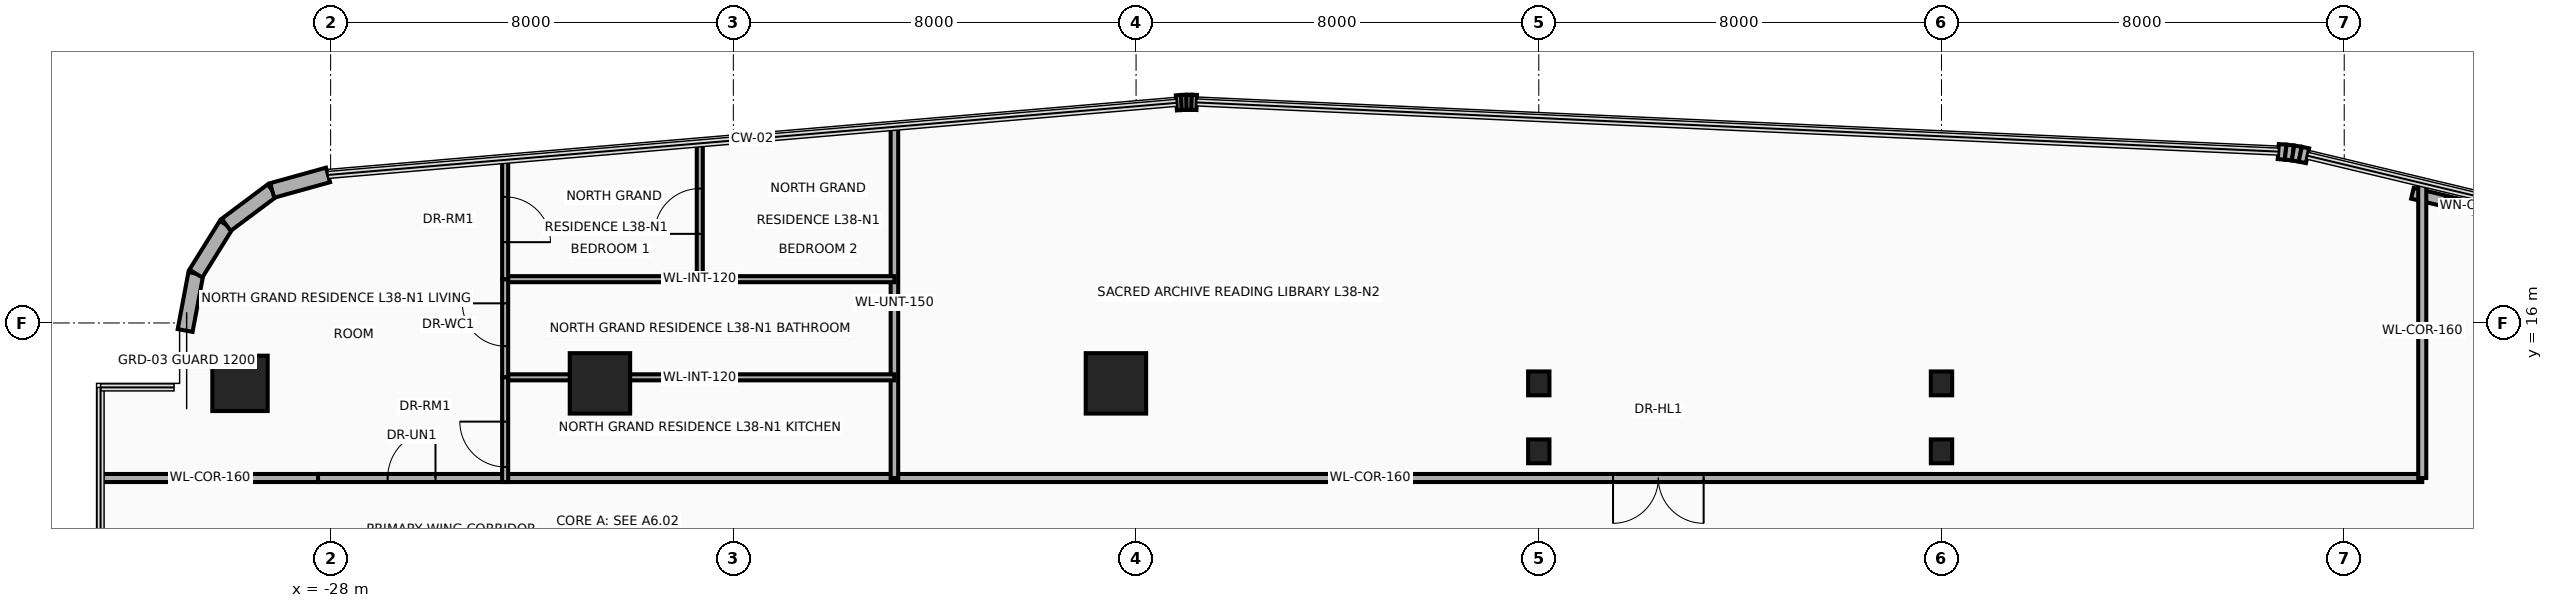
"""IFC4 building model, lengths in metres.
Left out: names, types, materials, properties, quantities, classifications, styles, units other than length and angle.
Written with IfcOpenShell. Run it as: python <this file> out.ifc"""

import sys

from ifc_helpers import new_model, si_unit, direction, frame, frame_2d, origin, origin_2d, place, context, subcontext, project, spatial, rectangle, circle, i_section, extrude, source, transform, mapped, element, fill, save


model = new_model("IFC4")
c1 = context("Model", 3, precision=1e-05, world=origin(), true_north=direction((0.0, 1.0)))
c2 = subcontext(c1, "Body", "Model", "MODEL_VIEW")
j1 = project(units=[si_unit("LENGTHUNIT", "METRE"), si_unit("PLANEANGLEUNIT", "RADIAN")], contexts=[c1])
p1 = place(None, origin())
s1 = spatial("IfcSite", under=j1, at=p1, CompositionType="ELEMENT")
p2 = place(p1, origin())
s2 = spatial("IfcBuilding", under=s1, at=p2, CompositionType="ELEMENT")
p3 = place(p2, frame((0.0, 0.0, 150.1)))
s3 = spatial("IfcBuildingStorey", under=s2, at=p3, CompositionType="ELEMENT", Elevation=150.1)
m1 = source(origin(), c2, "Body", "SweptSolid", [
    extrude(circle(Radius=0.55, at=origin_2d()), origin(), (0.0, 0.0, 1.0), 3.7),
])
p4 = place(p3, frame((-29.8, 14.8, 0.0), z_axis=(0.0, 0.0, 1.0), x_axis=(1.0, 0.0, 0.0)))
e1 = element("IfcColumn", 1, at=p4, inside=s3, PredefinedType="COLUMN", context=c2, shape_type="MappedRepresentation", body=[
    mapped(m1, transform((0.0, 0.0, 0.0), x_axis=(1.0, 0.0, 0.0), y_axis=(0.0, 1.0, 0.0), z_axis=(0.0, 0.0, 1.0), scale=1.0)),
])
m2 = source(origin(), c2, "Body", "SweptSolid", [
    extrude(rectangle(XDim=1.2, YDim=1.2, at=origin_2d()), origin(), (0.0, 0.0, 1.0), 3.7),
])
for number, where, z_axis, x_axis in (
    (2, (-22.65, 14.8, 0.0), (0.0, 0.0, 1.0), (1.0, 0.0, 0.0)),
    (3, (-12.4, 14.8, 0.0), (0.0, 0.0, 1.0), (1.0, 0.0, 0.0)),
):
    element("IfcColumn", number, at=place(p3, frame(where, z_axis=z_axis, x_axis=x_axis)), inside=s3, PredefinedType="COLUMN", context=c2, shape_type="MappedRepresentation", body=[
        mapped(m2, transform((0.0, 0.0, 0.0), x_axis=(1.0, 0.0, 0.0), y_axis=(0.0, 1.0, 0.0), z_axis=(0.0, 0.0, 1.0), scale=1.0)),
    ])
m3 = source(origin(), c2, "Body", "SweptSolid", [
    extrude(i_section(OverallWidth=0.424, OverallDepth=0.474, WebThickness=0.048, FlangeThickness=0.077, at=origin_2d()), origin(), (0.0, 0.0, 1.0), 3.7),
])
for number, where, z_axis, x_axis in (
    (4, (-4.0, 13.45, 0.0), (0.0, 0.0, 1.0), (1.0, 0.0, 0.0)),
    (5, (-4.0, 14.8, 0.0), (0.0, 0.0, 1.0), (1.0, 0.0, 0.0)),
    (6, (4.0, 13.45, 0.0), (0.0, 0.0, 1.0), (1.0, 0.0, 0.0)),
    (7, (4.0, 14.8, 0.0), (0.0, 0.0, 1.0), (1.0, 0.0, 0.0)),
):
    element("IfcColumn", number, at=place(p3, frame(where, z_axis=z_axis, x_axis=x_axis)), inside=s3, PredefinedType="COLUMN", context=c2, shape_type="MappedRepresentation", body=[
        mapped(m3, transform((0.0, 0.0, 0.0), x_axis=(1.0, 0.0, 0.0), y_axis=(0.0, 1.0, 0.0), z_axis=(0.0, 0.0, 1.0), scale=1.0)),
    ])
p5 = place(p3, frame((-30.89, 15.85, 0.0), z_axis=(0.0, 0.0, 1.0), x_axis=(0.184557499391, 0.982821718023, 0.0)))
e8 = element("IfcWall", 8, at=p5, inside=s3, PredefinedType="SOLIDWALL", context=c2, shape_type="SweptSolid", body=[
    extrude(rectangle(XDim=1.151, YDim=0.3, at=frame_2d((0.575, 0.0))), origin(), (0.0, 0.0, 1.0), 3.46),
])
p6 = place(p3, frame((-30.677, 16.981, 0.0), z_axis=(0.0, 0.0, 1.0), x_axis=(0.52880576008, 0.848742875143, 0.0)))
e9 = element("IfcWall", 9, at=p6, inside=s3, PredefinedType="SOLIDWALL", context=c2, shape_type="SweptSolid", body=[
    extrude(rectangle(XDim=1.141, YDim=0.3, at=frame_2d((0.57, 0.0))), origin(), (0.0, 0.0, 1.0), 3.46),
])
p7 = place(p3, frame((-30.074, 17.95, 0.0), z_axis=(0.0, 0.0, 1.0), x_axis=(0.800975009324, 0.598697782223, 0.0)))
e10 = element("IfcWall", 10, at=p7, inside=s3, PredefinedType="SOLIDWALL", context=c2, shape_type="SweptSolid", body=[
    extrude(rectangle(XDim=1.141, YDim=0.3, at=frame_2d((0.57, 0.0))), origin(), (0.0, 0.0, 1.0), 3.46),
])
p8 = place(p3, frame((-29.161, 18.633, 0.0), z_axis=(0.0, 0.0, 1.0), x_axis=(0.963624193367, 0.267260947313, 0.0)))
e11 = element("IfcWall", 11, at=p8, inside=s3, PredefinedType="SOLIDWALL", context=c2, shape_type="SweptSolid", body=[
    extrude(rectangle(XDim=1.151, YDim=0.3, at=frame_2d((0.575, 0.0))), origin(), (0.0, 0.0, 1.0), 3.46),
])
p9 = place(p3, frame((-11.199, 20.373, 0.0), z_axis=(0.0, 0.0, 1.0), x_axis=(0.997567332166, 0.069709524416, 0.0)))
e12 = element("IfcWall", 12, at=p9, inside=s3, PredefinedType="SOLIDWALL", context=c2, shape_type="SweptSolid", body=[
    extrude(rectangle(XDim=0.102, YDim=0.3, at=frame_2d((0.051, 0.0))), origin(), (0.0, 0.0, 1.0), 3.46),
])
p10 = place(p3, frame((-11.098, 20.38, 0.0), z_axis=(0.0, 0.0, 1.0), x_axis=(0.999334672785, 0.03647206835, 0.0)))
e13 = element("IfcWall", 13, at=p10, inside=s3, PredefinedType="SOLIDWALL", context=c2, shape_type="SweptSolid", body=[
    extrude(rectangle(XDim=0.1, YDim=0.3, at=frame_2d((0.05, 0.0))), origin(), (0.0, 0.0, 1.0), 3.46),
])
p11 = place(p3, frame((-10.998, 20.383, 0.0), z_axis=(0.0, 0.0, 1.0), x_axis=(0.999997054401, 0.002427177317, 0.0)))
e14 = element("IfcWall", 14, at=p11, inside=s3, PredefinedType="SOLIDWALL", context=c2, shape_type="SweptSolid", body=[
    extrude(rectangle(XDim=0.101, YDim=0.3, at=frame_2d((0.05, 0.0))), origin(), (0.0, 0.0, 1.0), 3.46),
])
p12 = place(p3, frame((-10.897, 20.384, 0.0), z_axis=(0.0, 0.0, 1.0), x_axis=(0.999584209171, -0.02883415988, 0.0)))
e15 = element("IfcWall", 15, at=p12, inside=s3, PredefinedType="SOLIDWALL", context=c2, shape_type="SweptSolid", body=[
    extrude(rectangle(XDim=0.102, YDim=0.3, at=frame_2d((0.051, 0.0))), origin(), (0.0, 0.0, 1.0), 3.46),
])
p13 = place(p3, frame((10.69, 19.404, 0.0), z_axis=(0.0, 0.0, 1.0), x_axis=(0.99758310784, -0.069483400546, 0.0)))
e16 = element("IfcWall", 16, at=p13, inside=s3, PredefinedType="SOLIDWALL", context=c2, shape_type="SweptSolid", body=[
    extrude(rectangle(XDim=0.147, YDim=0.3, at=frame_2d((0.074, 0.0))), origin(), (0.0, 0.0, 1.0), 3.46),
])
for number, where, z_axis, x_axis in (
    (17, (10.837, 19.394, 0.0), (0.0, 0.0, 1.0), (0.993, -0.117, 0.0)),
    (18, (10.983, 19.377, 0.0), (0.0, 0.0, 1.0), (0.987, -0.163, 0.0)),
):
    element("IfcWall", number, at=place(p3, frame(where, z_axis=z_axis, x_axis=x_axis)), inside=s3, PredefinedType="SOLIDWALL", context=c2, shape_type="SweptSolid", body=[
        extrude(rectangle(XDim=0.146, YDim=0.3, at=frame_2d((0.073, 0.0))), origin(), (0.0, 0.0, 1.0), 3.46),
    ])
p14 = place(p3, frame((11.127, 19.353, 0.0), z_axis=(0.0, 0.0, 1.0), x_axis=(0.978019841688, -0.208511844421, 0.0)))
e19 = element("IfcWall", 19, at=p14, inside=s3, PredefinedType="SOLIDWALL", context=c2, shape_type="SweptSolid", body=[
    extrude(rectangle(XDim=0.147, YDim=0.3, at=frame_2d((0.074, 0.0))), origin(), (0.0, 0.0, 1.0), 3.46),
])
p15 = place(p3, frame((13.355, 18.576, 0.0), z_axis=(0.0, 0.0, 1.0), x_axis=(0.97252211384, -0.232810519721, 0.0)))
e20 = element("IfcWall", 20, at=p15, inside=s3, PredefinedType="SOLIDWALL", context=c2, shape_type="SweptSolid", body=[
    extrude(rectangle(XDim=2.2, YDim=0.22, at=frame_2d((1.1, 0.0))), origin(), (0.0, 0.0, 1.0), 3.46),
])
p16 = place(p15, frame((0.65, 0.0, 0.95)))
e21 = element("IfcOpeningElement", 21, at=p16, cuts=e20, PredefinedType="OPENING", context=c2, shape_type="SweptSolid", body=[
    extrude(rectangle(XDim=0.9, YDim=1.3, at=frame_2d((0.45, 0.65))), frame((0.0, 0.125, 0.0), z_axis=(0.0, -1.0, 0.0), x_axis=(1.0, 0.0, 0.0)), (0.0, 0.0, 1.0), 0.25),
])
p17 = place(p3, frame((-32.54, 12.92, 0.0), z_axis=(0.0, 0.0, 1.0), x_axis=(1.0, 0.0, 0.0)))
e22 = element("IfcWall", 22, at=p17, inside=s3, PredefinedType="PARTITIONING", context=c2, shape_type="SweptSolid", body=[
    extrude(rectangle(XDim=4.29, YDim=0.16, at=frame_2d((2.145, 0.0))), origin(), (0.0, 0.0, 1.0), 2.896),
])
p18 = place(p3, frame((-28.25, 12.92, 0.0), z_axis=(0.0, 0.0, 1.0), x_axis=(1.0, 0.0, 0.0)))
e23 = element("IfcWall", 23, at=p18, inside=s3, PredefinedType="PARTITIONING", context=c2, shape_type="SweptSolid", body=[
    extrude(rectangle(XDim=41.8, YDim=0.16, at=frame_2d((20.9, 0.0))), origin(), (0.0, 0.0, 1.0), 2.666),
])
p19 = place(p18, frame((1.383, 0.0, 0.0)))
e24 = element("IfcOpeningElement", 24, at=p19, cuts=e23, PredefinedType="OPENING", context=c2, shape_type="SweptSolid", body=[
    extrude(rectangle(XDim=0.95, YDim=2.15, at=frame_2d((0.475, 1.075))), frame((0.0, 0.095, 0.0), z_axis=(0.0, -1.0, 0.0), x_axis=(1.0, 0.0, 0.0)), (0.0, 0.0, 1.0), 0.19),
])
p20 = place(p18, frame((25.725, 0.0, 0.0)))
e25 = element("IfcOpeningElement", 25, at=p20, cuts=e23, PredefinedType="OPENING", context=c2, shape_type="SweptSolid", body=[
    extrude(rectangle(XDim=1.8, YDim=2.15, at=frame_2d((0.9, 1.075))), frame((0.0, 0.095, 0.0), z_axis=(0.0, -1.0, 0.0), x_axis=(1.0, 0.0, 0.0)), (0.0, 0.0, 1.0), 0.19),
])
p21 = place(p3, frame((13.55, 12.92, 0.0), z_axis=(0.0, 0.0, 1.0), x_axis=(0.0, 1.0, 0.0)))
e26 = element("IfcWall", 26, at=p21, inside=s3, PredefinedType="PARTITIONING", context=c2, shape_type="SweptSolid", body=[
    extrude(rectangle(XDim=5.857, YDim=0.16, at=frame_2d((2.928, 0.0))), origin(), (0.0, 0.0, 1.0), 2.666),
])
p22 = place(p3, frame((-16.8, 12.92, 0.0), z_axis=(0.0, 0.0, 1.0), x_axis=(0.0, 1.0, 0.0)))
e27 = element("IfcWall", 27, at=p22, inside=s3, PredefinedType="PARTITIONING", context=c2, shape_type="SweptSolid", body=[
    extrude(rectangle(XDim=6.977, YDim=0.15, at=frame_2d((3.488, 0.0))), origin(), (0.0, 0.0, 1.0), 2.666),
])
p23 = place(p3, frame((-24.533, 14.92, 0.0), z_axis=(0.0, 0.0, 1.0), x_axis=(1.0, 0.0, 0.0)))
e28 = element("IfcWall", 28, at=p23, inside=s3, PredefinedType="PARTITIONING", context=c2, shape_type="SweptSolid", body=[
    extrude(rectangle(XDim=7.733, YDim=0.12, at=frame_2d((3.866, 0.0))), origin(), (0.0, 0.0, 1.0), 2.666),
])
p24 = place(p3, frame((-24.533, 16.87, 0.0), z_axis=(0.0, 0.0, 1.0), x_axis=(1.0, 0.0, 0.0)))
e29 = element("IfcWall", 29, at=p24, inside=s3, PredefinedType="PARTITIONING", context=c2, shape_type="SweptSolid", body=[
    extrude(rectangle(XDim=7.733, YDim=0.12, at=frame_2d((3.866, 0.0))), origin(), (0.0, 0.0, 1.0), 3.46),
])
p25 = place(p3, frame((-24.533, 14.92, 0.0), z_axis=(0.0, 0.0, 1.0), x_axis=(0.0, 1.0, 0.0)))
e30 = element("IfcWall", 30, at=p25, inside=s3, PredefinedType="PARTITIONING", context=c2, shape_type="SweptSolid", body=[
    extrude(rectangle(XDim=1.95, YDim=0.12, at=frame_2d((0.975, 0.0))), origin(), (0.0, 0.0, 1.0), 2.666),
])
p26 = place(p25, frame((0.62, 0.0, 0.0)))
e31 = element("IfcOpeningElement", 31, at=p26, cuts=e30, PredefinedType="OPENING", context=c2, shape_type="SweptSolid", body=[
    extrude(rectangle(XDim=0.85, YDim=2.1, at=frame_2d((0.425, 1.05))), frame((0.0, 0.075, 0.0), z_axis=(0.0, -1.0, 0.0), x_axis=(1.0, 0.0, 0.0)), (0.0, 0.0, 1.0), 0.15),
])
p27 = place(p3, frame((-24.533, 12.84, 0.0), z_axis=(0.0, 0.0, 1.0), x_axis=(0.0, 1.0, 0.0)))
e32 = element("IfcWall", 32, at=p27, inside=s3, PredefinedType="PARTITIONING", context=c2, shape_type="SweptSolid", body=[
    extrude(rectangle(XDim=2.08, YDim=0.12, at=frame_2d((1.04, 0.0))), origin(), (0.0, 0.0, 1.0), 2.666),
])
p28 = place(p27, frame((0.3, 0.0, 0.0)))
e33 = element("IfcOpeningElement", 33, at=p28, cuts=e32, PredefinedType="OPENING", context=c2, shape_type="SweptSolid", body=[
    extrude(rectangle(XDim=0.9, YDim=2.1, at=frame_2d((0.45, 1.05))), frame((0.0, 0.075, 0.0), z_axis=(0.0, -1.0, 0.0), x_axis=(1.0, 0.0, 0.0)), (0.0, 0.0, 1.0), 0.15),
])
p29 = place(p3, frame((-24.533, 16.87, 0.0), z_axis=(0.0, 0.0, 1.0), x_axis=(0.0, 1.0, 0.0)))
e34 = element("IfcWall", 34, at=p29, inside=s3, PredefinedType="PARTITIONING", context=c2, shape_type="SweptSolid", body=[
    extrude(rectangle(XDim=2.369, YDim=0.12, at=frame_2d((1.185, 0.0))), origin(), (0.0, 0.0, 1.0), 3.46),
])
p30 = place(p29, frame((0.735, 0.0, 0.0)))
e35 = element("IfcOpeningElement", 35, at=p30, cuts=e34, PredefinedType="OPENING", context=c2, shape_type="SweptSolid", body=[
    extrude(rectangle(XDim=0.9, YDim=2.1, at=frame_2d((0.45, 1.05))), frame((0.0, 0.075, 0.0), z_axis=(0.0, -1.0, 0.0), x_axis=(1.0, 0.0, 0.0)), (0.0, 0.0, 1.0), 0.15),
])
p31 = place(p3, frame((-20.667, 16.87, 0.0), z_axis=(0.0, 0.0, 1.0), x_axis=(0.0, 1.0, 0.0)))
e36 = element("IfcWall", 36, at=p31, inside=s3, PredefinedType="PARTITIONING", context=c2, shape_type="SweptSolid", body=[
    extrude(rectangle(XDim=2.698, YDim=0.12, at=frame_2d((1.349, 0.0))), origin(), (0.0, 0.0, 1.0), 3.46),
])
p32 = place(p31, frame((0.9, 0.0, 0.0)))
e37 = element("IfcOpeningElement", 37, at=p32, cuts=e36, PredefinedType="OPENING", context=c2, shape_type="SweptSolid", body=[
    extrude(rectangle(XDim=0.9, YDim=2.1, at=frame_2d((0.45, 1.05))), frame((0.0, 0.075, 0.0), z_axis=(0.0, -1.0, 0.0), x_axis=(1.0, 0.0, 0.0)), (0.0, 0.0, 1.0), 0.15),
])
p33 = place(p16, origin())
e38 = element("IfcWindow", 38, at=p33, inside=s3, PartitioningType="SINGLE_PANEL", PredefinedType="WINDOW", context=c2, shape_type="SweptSolid", body=[
    extrude(rectangle(XDim=0.9, YDim=1.3, at=frame_2d((0.45, 0.65))), frame((0.0, 0.03, 0.0), z_axis=(0.0, -1.0, 0.0), x_axis=(1.0, 0.0, 0.0)), (0.0, 0.0, 1.0), 0.06),
])
fill(e21, e38)
p34 = place(p19, origin())
e39 = element("IfcDoor", 39, at=p34, inside=s3, OperationType="SINGLE_SWING_RIGHT", PredefinedType="DOOR", context=c2, shape_type="SweptSolid", body=[
    extrude(rectangle(XDim=0.95, YDim=2.15, at=frame_2d((0.475, 1.075))), frame((0.0, 0.025, 0.0), z_axis=(0.0, -1.0, 0.0), x_axis=(1.0, 0.0, 0.0)), (0.0, 0.0, 1.0), 0.05),
])
fill(e24, e39)
p35 = place(p26, origin())
e40 = element("IfcDoor", 40, at=p35, inside=s3, OperationType="SINGLE_SWING_LEFT", PredefinedType="DOOR", context=c2, shape_type="SweptSolid", body=[
    extrude(rectangle(XDim=0.85, YDim=2.1, at=frame_2d((0.425, 1.05))), frame((0.0, 0.025, 0.0), z_axis=(0.0, -1.0, 0.0), x_axis=(1.0, 0.0, 0.0)), (0.0, 0.0, 1.0), 0.05),
])
fill(e31, e40)
p36 = place(p28, origin())
e41 = element("IfcDoor", 41, at=p36, inside=s3, OperationType="SINGLE_SWING_RIGHT", PredefinedType="DOOR", context=c2, shape_type="SweptSolid", body=[
    extrude(rectangle(XDim=0.9, YDim=2.1, at=frame_2d((0.45, 1.05))), frame((0.0, 0.025, 0.0), z_axis=(0.0, -1.0, 0.0), x_axis=(1.0, 0.0, 0.0)), (0.0, 0.0, 1.0), 0.05),
])
fill(e33, e41)
p37 = place(p30, frame((0.9, 0.0, 0.0), z_axis=(0.0, 0.0, 1.0), x_axis=(-1.0, 0.0, 0.0)))
e42 = element("IfcDoor", 42, at=p37, inside=s3, OperationType="SINGLE_SWING_LEFT", PredefinedType="DOOR", context=c2, shape_type="SweptSolid", body=[
    extrude(rectangle(XDim=0.9, YDim=2.1, at=frame_2d((0.45, 1.05))), frame((0.0, 0.025, 0.0), z_axis=(0.0, -1.0, 0.0), x_axis=(1.0, 0.0, 0.0)), (0.0, 0.0, 1.0), 0.05),
])
fill(e35, e42)
p38 = place(p32, origin())
e43 = element("IfcDoor", 43, at=p38, inside=s3, OperationType="SINGLE_SWING_RIGHT", PredefinedType="DOOR", context=c2, shape_type="SweptSolid", body=[
    extrude(rectangle(XDim=0.9, YDim=2.1, at=frame_2d((0.45, 1.05))), frame((0.0, 0.025, 0.0), z_axis=(0.0, -1.0, 0.0), x_axis=(1.0, 0.0, 0.0)), (0.0, 0.0, 1.0), 0.05),
])
fill(e37, e43)
p39 = place(p20, frame((1.8, 0.0, 0.0), z_axis=(0.0, 0.0, 1.0), x_axis=(-1.0, 0.0, 0.0)))
e44 = element("IfcDoor", 44, at=p39, inside=s3, OperationType="DOUBLE_DOOR_SINGLE_SWING", PredefinedType="DOOR", context=c2, shape_type="SweptSolid", body=[
    extrude(rectangle(XDim=1.8, YDim=2.15, at=frame_2d((0.9, 1.075))), frame((0.0, 0.025, 0.0), z_axis=(0.0, -1.0, 0.0), x_axis=(1.0, 0.0, 0.0)), (0.0, 0.0, 1.0), 0.05),
])
fill(e25, e44)
save(model, sys.argv[1])
